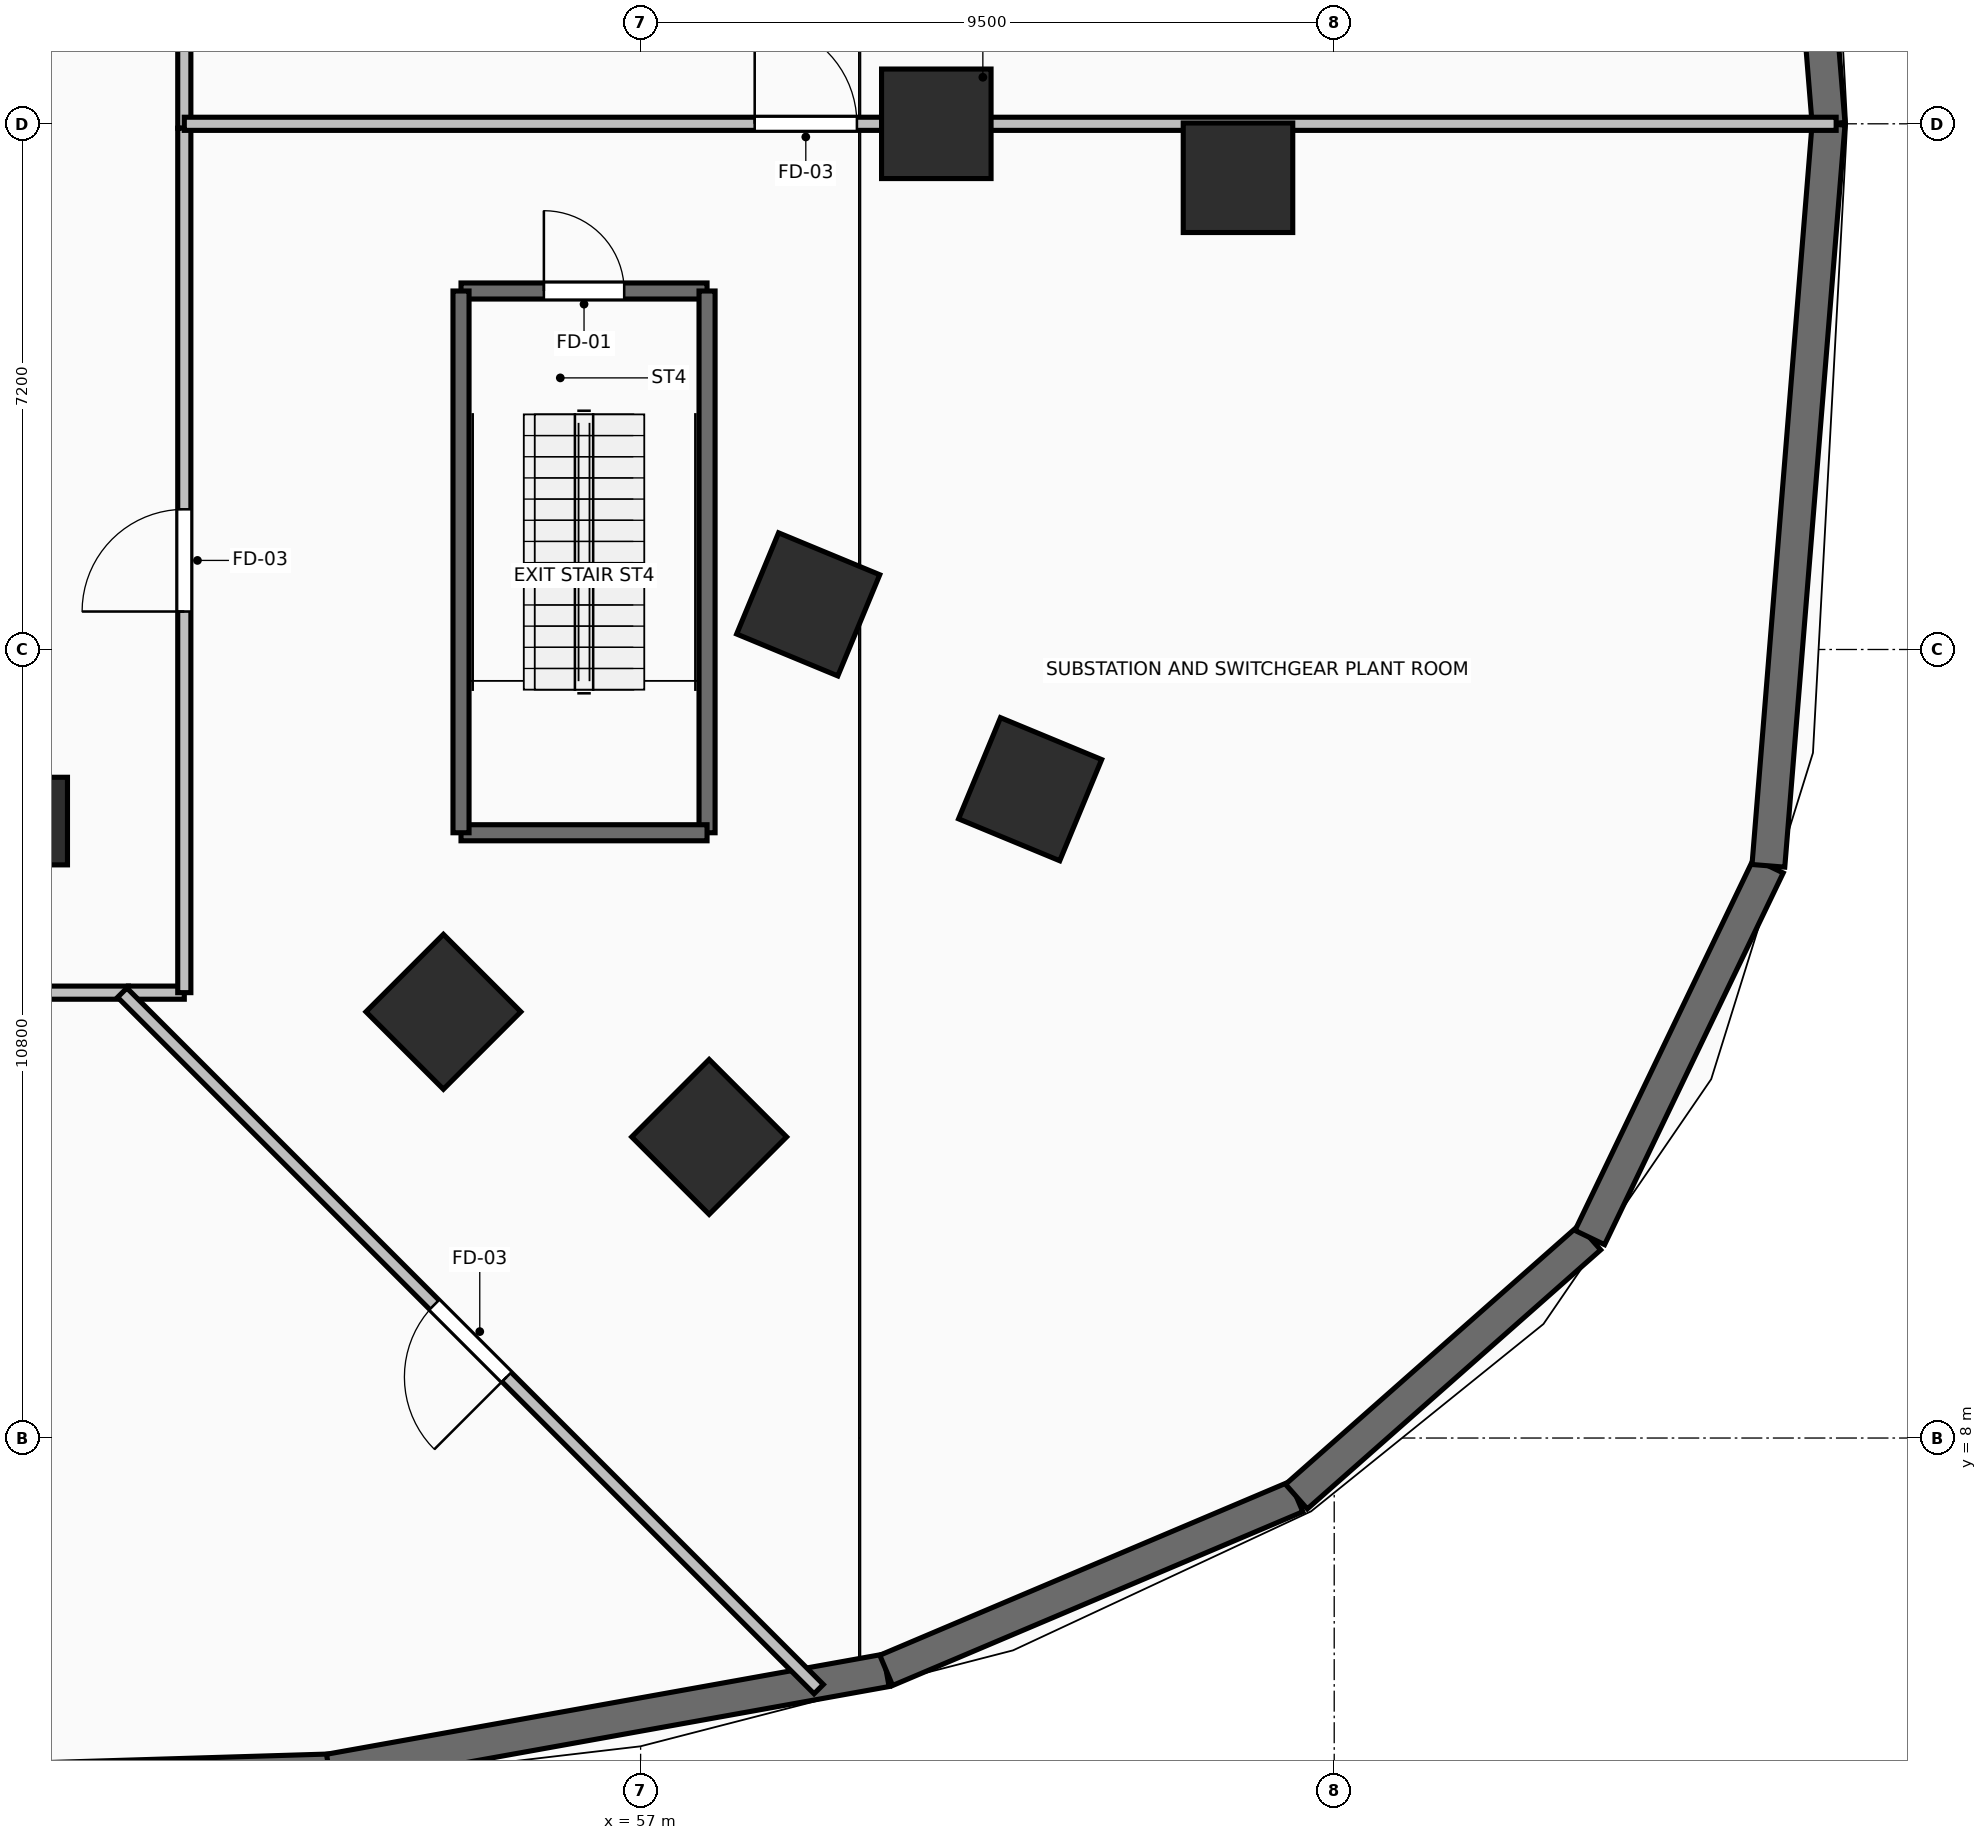
"""IFC4 building model, lengths in metres.
Left out: names, types, materials, properties, quantities, classifications, styles, units other than length and angle.
Written with IfcOpenShell. Run it as: python <this file> out.ifc"""

import sys

from ifc_helpers import new_model, si_unit, direction, frame, frame_2d, origin, origin_2d, place, context, subcontext, project, spatial, rectangle, extrude, element, fill, save


model = new_model("IFC4")
c1 = context("Model", 3, precision=1e-05, world=origin(), true_north=direction((0.0, 1.0)))
c2 = subcontext(c1, "Body", "Model", "MODEL_VIEW")
j1 = project(units=[si_unit("LENGTHUNIT", "METRE"), si_unit("PLANEANGLEUNIT", "RADIAN")], contexts=[c1])
p1 = place(None, origin())
s1 = spatial("IfcSite", under=j1, at=p1, CompositionType="ELEMENT")
p2 = place(p1, origin())
s2 = spatial("IfcBuilding", under=s1, at=p2, CompositionType="ELEMENT")
p3 = place(p2, frame((0.0, 0.0, -9.6)))
s3 = spatial("IfcBuildingStorey", under=s2, at=p3, CompositionType="ELEMENT", Elevation=-9.6)
for number, where, z_axis, x_axis in (
    (1, (61.05, 26.0, 0.0), (0.0, 0.0, 1.0), (1.0, 0.0, 0.0)),
    (2, (54.299, 13.838, 0.0), (0.0, 0.0, 1.0), (0.707, -0.707, 0.0)),
    (3, (59.295, 19.418, 0.0), (0.0, 0.0, 1.0), (0.924, -0.383, 0.0)),
    (4, (65.182, 25.261, 0.0), (0.0, 0.0, 1.0), (1.0, 0.0, 0.0)),
    (5, (57.939, 12.124, 0.0), (0.0, 0.0, 1.0), (0.707, -0.707, 0.0)),
    (6, (62.335, 16.886, 0.0), (0.0, 0.0, 1.0), (0.924, -0.383, 0.0)),
):
    element("IfcColumn", number, at=place(p3, frame(where, z_axis=z_axis, x_axis=x_axis)), inside=s3, PredefinedType="COLUMN", context=c2, shape_type="SweptSolid", body=[
        extrude(rectangle(XDim=1.5, YDim=1.5, at=origin_2d()), origin(), (0.0, 0.0, 1.0), 4.8),
    ])
p4 = place(p3, frame((48.75, 16.45, 0.0), z_axis=(0.0, 0.0, 1.0), x_axis=(1.0, 0.0, 0.0)))
e7 = element("IfcColumn", 7, at=p4, inside=s3, PredefinedType="PILASTER", context=c2, shape_type="SweptSolid", body=[
    extrude(rectangle(XDim=0.8, YDim=1.2, at=origin_2d()), origin(), (0.0, 0.0, 1.0), 4.8),
])
p5 = place(p3, frame((73.271, 26.0, 0.0), z_axis=(0.0, 0.0, 1.0), x_axis=(-0.080835799126, 0.996727431939, 0.0)))
e8 = element("IfcWall", 8, at=p5, inside=s3, PredefinedType="SOLIDWALL", context=c2, shape_type="SweptSolid", body=[
    extrude(rectangle(XDim=10.196, YDim=0.45, at=frame_2d((5.098, 0.0))), origin(), (0.0, 0.0, 1.0), 4.45),
])
p6 = place(p3, frame((38.0, 3.0, 0.0), z_axis=(0.0, 0.0, 1.0), x_axis=(0.999540251976, 0.030319707786, 0.0)))
e9 = element("IfcWall", 9, at=p6, inside=s3, PredefinedType="SOLIDWALL", context=c2, shape_type="SweptSolid", body=[
    extrude(rectangle(XDim=14.744, YDim=0.45, at=frame_2d((7.372, 0.0))), origin(), (0.0, 0.0, 1.0), 4.45),
])
p7 = place(p3, frame((52.737, 3.447, 0.0), z_axis=(0.0, 0.0, 1.0), x_axis=(0.984238318617, 0.176847200051, 0.0)))
e10 = element("IfcWall", 10, at=p7, inside=s3, PredefinedType="SOLIDWALL", context=c2, shape_type="SweptSolid", body=[
    extrude(rectangle(XDim=7.749, YDim=0.45, at=frame_2d((3.875, 0.0))), origin(), (0.0, 0.0, 1.0), 4.45),
])
p8 = place(p3, frame((60.364, 4.818, 0.0), z_axis=(0.0, 0.0, 1.0), x_axis=(0.92081090532, 0.390009328919, 0.0)))
e11 = element("IfcWall", 11, at=p8, inside=s3, PredefinedType="SOLIDWALL", context=c2, shape_type="SweptSolid", body=[
    extrude(rectangle(XDim=6.102, YDim=0.45, at=frame_2d((3.051, 0.0))), origin(), (0.0, 0.0, 1.0), 4.45),
])
p9 = place(p3, frame((65.982, 7.198, 0.0), z_axis=(0.0, 0.0, 1.0), x_axis=(0.749561336725, 0.661934892937, 0.0)))
e12 = element("IfcWall", 12, at=p9, inside=s3, PredefinedType="SOLIDWALL", context=c2, shape_type="SweptSolid", body=[
    extrude(rectangle(XDim=5.361, YDim=0.45, at=frame_2d((2.68, 0.0))), origin(), (0.0, 0.0, 1.0), 4.45),
])
p10 = place(p3, frame((70.0, 10.746, 0.0), z_axis=(0.0, 0.0, 1.0), x_axis=(0.433120243411, 0.901336149695, 0.0)))
e13 = element("IfcWall", 13, at=p10, inside=s3, PredefinedType="SOLIDWALL", context=c2, shape_type="SweptSolid", body=[
    extrude(rectangle(XDim=5.649, YDim=0.45, at=frame_2d((2.824, 0.0))), origin(), (0.0, 0.0, 1.0), 4.45),
])
p11 = place(p3, frame((72.447, 15.837, 0.0), z_axis=(0.0, 0.0, 1.0), x_axis=(0.080835799126, 0.996727431939, 0.0)))
e14 = element("IfcWall", 14, at=p11, inside=s3, PredefinedType="SOLIDWALL", context=c2, shape_type="SweptSolid", body=[
    extrude(rectangle(XDim=10.196, YDim=0.45, at=frame_2d((5.098, 0.0))), origin(), (0.0, 0.0, 1.0), 4.45),
])
p12 = place(p3, frame((54.54, 23.71, 0.0), z_axis=(0.0, 0.0, 1.0), x_axis=(1.0, 0.0, 0.0)))
e15 = element("IfcWall", 15, at=p12, inside=s3, PredefinedType="SOLIDWALL", context=c2, shape_type="SweptSolid", body=[
    extrude(rectangle(XDim=3.37, YDim=0.22, at=frame_2d((1.685, 0.0))), origin(), (0.0, 0.0, 1.0), 4.45),
])
p13 = place(p12, frame((1.135, 0.0, 0.0)))
e16 = element("IfcOpeningElement", 16, at=p13, cuts=e15, PredefinedType="OPENING", context=c2, shape_type="SweptSolid", body=[
    extrude(rectangle(XDim=1.1, YDim=2.15, at=frame_2d((0.55, 1.075))), frame((0.0, 0.125, 0.0), z_axis=(0.0, -1.0, 0.0), x_axis=(1.0, 0.0, 0.0)), (0.0, 0.0, 1.0), 0.25),
])
p14 = place(p3, frame((57.91, 23.71, 0.0), z_axis=(0.0, 0.0, 1.0), x_axis=(0.0, -1.0, 0.0)))
e17 = element("IfcWall", 17, at=p14, inside=s3, PredefinedType="SOLIDWALL", context=c2, shape_type="SweptSolid", body=[
    extrude(rectangle(XDim=7.42, YDim=0.22, at=frame_2d((3.71, 0.0))), origin(), (0.0, 0.0, 1.0), 4.45),
])
p15 = place(p3, frame((57.91, 16.29, 0.0), z_axis=(0.0, 0.0, 1.0), x_axis=(-1.0, 0.0, 0.0)))
e18 = element("IfcWall", 18, at=p15, inside=s3, PredefinedType="SOLIDWALL", context=c2, shape_type="SweptSolid", body=[
    extrude(rectangle(XDim=3.37, YDim=0.22, at=frame_2d((1.685, 0.0))), origin(), (0.0, 0.0, 1.0), 4.45),
])
p16 = place(p3, frame((54.54, 16.29, 0.0), z_axis=(0.0, 0.0, 1.0), x_axis=(0.0, 1.0, 0.0)))
e19 = element("IfcWall", 19, at=p16, inside=s3, PredefinedType="SOLIDWALL", context=c2, shape_type="SweptSolid", body=[
    extrude(rectangle(XDim=7.42, YDim=0.22, at=frame_2d((3.71, 0.0))), origin(), (0.0, 0.0, 1.0), 4.45),
])
p17 = place(p3, frame((50.75, 25.94, 0.0), z_axis=(0.0, 0.0, 1.0), x_axis=(0.0, 1.0, 0.0)))
e20 = element("IfcWall", 20, at=p17, inside=s3, PredefinedType="PARTITIONING", context=c2, shape_type="SweptSolid", body=[
    extrude(rectangle(XDim=10.01, YDim=0.18, at=frame_2d((5.005, 0.0))), origin(), (0.0, 0.0, 1.0), 3.642),
])
p18 = place(p17, frame((4.305, 0.0, 0.0)))
e21 = element("IfcOpeningElement", 21, at=p18, cuts=e20, PredefinedType="OPENING", context=c2, shape_type="SweptSolid", body=[
    extrude(rectangle(XDim=1.4, YDim=2.2, at=frame_2d((0.7, 1.1))), frame((0.0, 0.105, 0.0), z_axis=(0.0, -1.0, 0.0), x_axis=(1.0, 0.0, 0.0)), (0.0, 0.0, 1.0), 0.21),
])
p19 = place(p3, frame((42.34, 14.1, 0.0), z_axis=(0.0, 0.0, 1.0), x_axis=(1.0, 0.0, 0.0)))
e22 = element("IfcWall", 22, at=p19, inside=s3, PredefinedType="PARTITIONING", context=c2, shape_type="SweptSolid", body=[
    extrude(rectangle(XDim=7.645, YDim=0.18, at=frame_2d((3.823, 0.0))), origin(), (0.0, 0.0, 1.0), 3.642),
])
p20 = place(p19, frame((3.123, 0.0, 0.0)))
e23 = element("IfcOpeningElement", 23, at=p20, cuts=e22, PredefinedType="OPENING", context=c2, shape_type="SweptSolid", body=[
    extrude(rectangle(XDim=1.4, YDim=2.2, at=frame_2d((0.7, 1.1))), frame((0.0, 0.105, 0.0), z_axis=(0.0, -1.0, 0.0), x_axis=(1.0, 0.0, 0.0)), (0.0, 0.0, 1.0), 0.21),
])
p21 = place(p3, frame((49.985, 14.1, 0.0), z_axis=(0.0, 0.0, 1.0), x_axis=(1.0, 0.0, 0.0)))
e24 = element("IfcWall", 24, at=p21, inside=s3, PredefinedType="PARTITIONING", context=c2, shape_type="SweptSolid", body=[
    extrude(rectangle(XDim=0.765, YDim=0.18, at=frame_2d((0.382, 0.0))), origin(), (0.0, 0.0, 1.0), 4.084),
])
p22 = place(p3, frame((50.75, 14.1, 0.0), z_axis=(0.0, 0.0, 1.0), x_axis=(0.0, 1.0, 0.0)))
e25 = element("IfcWall", 25, at=p22, inside=s3, PredefinedType="PARTITIONING", context=c2, shape_type="SweptSolid", body=[
    extrude(rectangle(XDim=11.84, YDim=0.18, at=frame_2d((5.92, 0.0))), origin(), (0.0, 0.0, 1.0), 3.642),
])
p23 = place(p22, frame((5.22, 0.0, 0.0)))
e26 = element("IfcOpeningElement", 26, at=p23, cuts=e25, PredefinedType="OPENING", context=c2, shape_type="SweptSolid", body=[
    extrude(rectangle(XDim=1.4, YDim=2.2, at=frame_2d((0.7, 1.1))), frame((0.0, 0.105, 0.0), z_axis=(0.0, -1.0, 0.0), x_axis=(1.0, 0.0, 0.0)), (0.0, 0.0, 1.0), 0.21),
])
p24 = place(p3, frame((50.75, 26.0, 0.0), z_axis=(0.0, 0.0, 1.0), x_axis=(1.0, 0.0, 0.0)))
e27 = element("IfcWall", 27, at=p24, inside=s3, PredefinedType="PARTITIONING", context=c2, shape_type="SweptSolid", body=[
    extrude(rectangle(XDim=22.625, YDim=0.18, at=frame_2d((11.312, 0.0))), origin(), (0.0, 0.0, 1.0), 3.642),
])
p25 = place(p24, frame((7.812, 0.0, 0.0)))
e28 = element("IfcOpeningElement", 28, at=p25, cuts=e27, PredefinedType="OPENING", context=c2, shape_type="SweptSolid", body=[
    extrude(rectangle(XDim=1.4, YDim=2.2, at=frame_2d((0.7, 1.1))), frame((0.0, 0.105, 0.0), z_axis=(0.0, -1.0, 0.0), x_axis=(1.0, 0.0, 0.0)), (0.0, 0.0, 1.0), 0.21),
])
p26 = place(p3, frame((59.439, 4.561, 0.0), z_axis=(0.0, 0.0, 1.0), x_axis=(-0.707106781187, 0.707106781187, 0.0)))
e29 = element("IfcWall", 29, at=p26, inside=s3, PredefinedType="PARTITIONING", context=c2, shape_type="SweptSolid", body=[
    extrude(rectangle(XDim=13.49, YDim=0.18, at=frame_2d((6.745, 0.0))), origin(), (0.0, 0.0, 1.0), 3.739),
])
p27 = place(p26, frame((6.045, 0.0, 0.0)))
e30 = element("IfcOpeningElement", 30, at=p27, cuts=e29, PredefinedType="OPENING", context=c2, shape_type="SweptSolid", body=[
    extrude(rectangle(XDim=1.4, YDim=2.2, at=frame_2d((0.7, 1.1))), frame((0.0, 0.105, 0.0), z_axis=(0.0, -1.0, 0.0), x_axis=(1.0, 0.0, 0.0)), (0.0, 0.0, 1.0), 0.21),
])
p28 = place(p13, origin())
e31 = element("IfcDoor", 31, at=p28, inside=s3, OperationType="SINGLE_SWING_LEFT", PredefinedType="DOOR", context=c2, shape_type="SweptSolid", body=[
    extrude(rectangle(XDim=1.1, YDim=2.15, at=frame_2d((0.55, 1.075))), frame((0.0, 0.025, 0.0), z_axis=(0.0, -1.0, 0.0), x_axis=(1.0, 0.0, 0.0)), (0.0, 0.0, 1.0), 0.05),
])
fill(e16, e31)
p29 = place(p23, origin())
e32 = element("IfcDoor", 32, at=p29, inside=s3, OperationType="DOUBLE_SWING_LEFT", PredefinedType="DOOR", context=c2, shape_type="SweptSolid", body=[
    extrude(rectangle(XDim=1.4, YDim=2.2, at=frame_2d((0.7, 1.1))), frame((0.0, 0.025, 0.0), z_axis=(0.0, -1.0, 0.0), x_axis=(1.0, 0.0, 0.0)), (0.0, 0.0, 1.0), 0.05),
])
fill(e26, e32)
p30 = place(p25, origin())
e33 = element("IfcDoor", 33, at=p30, inside=s3, OperationType="DOUBLE_SWING_LEFT", PredefinedType="DOOR", context=c2, shape_type="SweptSolid", body=[
    extrude(rectangle(XDim=1.4, YDim=2.2, at=frame_2d((0.7, 1.1))), frame((0.0, 0.025, 0.0), z_axis=(0.0, -1.0, 0.0), x_axis=(1.0, 0.0, 0.0)), (0.0, 0.0, 1.0), 0.05),
])
fill(e28, e33)
p31 = place(p27, origin())
e34 = element("IfcDoor", 34, at=p31, inside=s3, OperationType="DOUBLE_SWING_LEFT", PredefinedType="DOOR", context=c2, shape_type="SweptSolid", body=[
    extrude(rectangle(XDim=1.4, YDim=2.2, at=frame_2d((0.7, 1.1))), frame((0.0, 0.025, 0.0), z_axis=(0.0, -1.0, 0.0), x_axis=(1.0, 0.0, 0.0)), (0.0, 0.0, 1.0), 0.05),
])
fill(e30, e34)
save(model, sys.argv[1])
